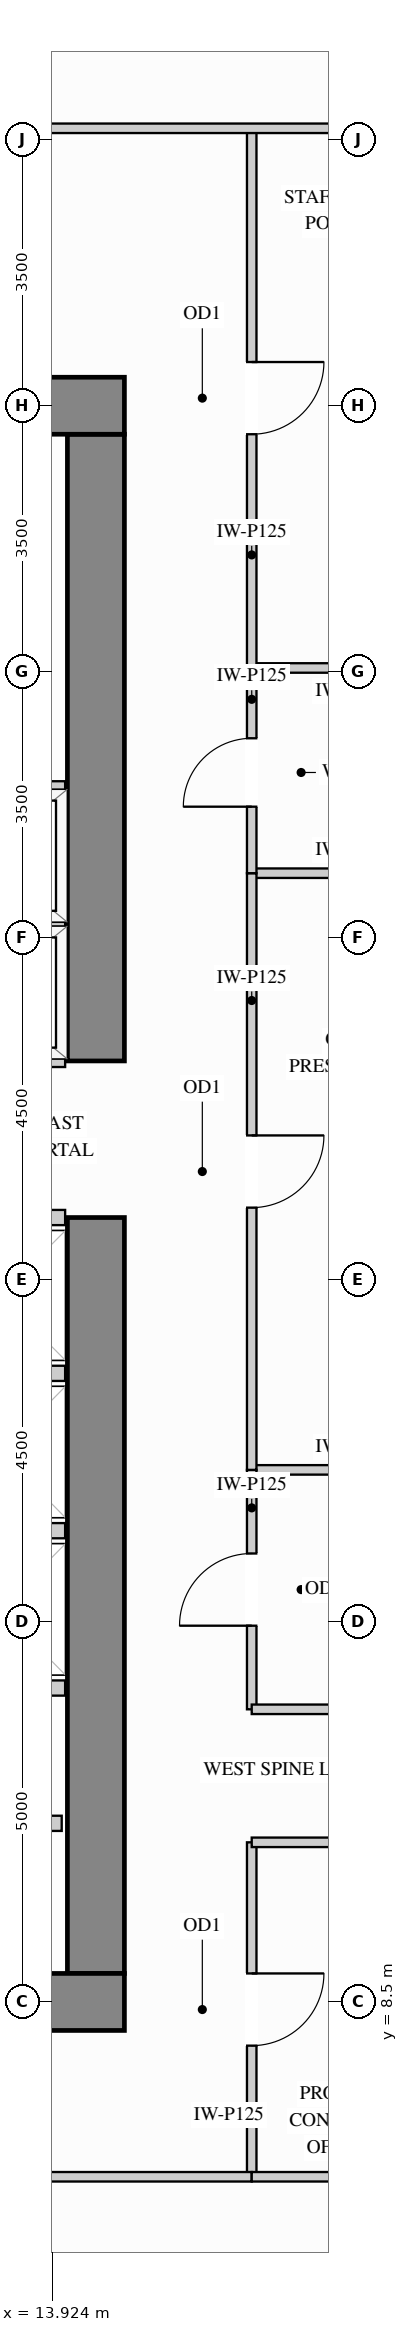
"""IFC4 building model, lengths in metres.
Left out: names, types, materials, properties, quantities, classifications, styles, units other than length and angle.
Written with IfcOpenShell. Run it as: python <this file> out.ifc"""

import sys

from ifc_helpers import new_model, si_unit, direction, frame, frame_2d, origin, place, context, subcontext, project, spatial, rectangle, extrude, source, transform, mapped, element, fill, save


model = new_model("IFC4")
c1 = context("Model", 3, precision=1e-05, world=origin(), true_north=direction((0.0, 1.0)))
c2 = subcontext(c1, "Body", "Model", "MODEL_VIEW")
j1 = project(units=[si_unit("LENGTHUNIT", "METRE"), si_unit("PLANEANGLEUNIT", "RADIAN")], contexts=[c1])
p1 = place(None, origin())
s1 = spatial("IfcSite", under=j1, at=p1, CompositionType="ELEMENT")
p2 = place(p1, origin())
s2 = spatial("IfcBuilding", under=s1, at=p2, CompositionType="ELEMENT")
p3 = place(p2, frame((0.0, 0.0, 135.0)))
s3 = spatial("IfcBuildingStorey", under=s2, at=p3, CompositionType="ELEMENT", Elevation=135.0)
m1 = source(origin(), c2, "Body", "SweptSolid", [
    extrude(rectangle(XDim=9.945, YDim=0.75, at=frame_2d((4.973, 0.0))), origin(), (0.0, 0.0, 1.0), 3.32),
])
p4 = place(p3, frame((14.5, 8.875, 0.0), z_axis=(0.0, 0.0, 1.0), x_axis=(0.0, 1.0, 0.0)))
e1 = element("IfcWall", 1, at=p4, inside=s3, PredefinedType="SHEAR", context=c2, shape_type="MappedRepresentation", body=[
    mapped(m1, transform((0.0, 0.0, 0.0), x_axis=(1.0, 0.0, 0.0), y_axis=(0.0, 1.0, 0.0), z_axis=(0.0, 0.0, 1.0))),
])
m2 = source(origin(), c2, "Body", "SweptSolid", [
    extrude(rectangle(XDim=8.245, YDim=0.75, at=frame_2d((4.123, 0.0))), origin(), (0.0, 0.0, 1.0), 3.32),
])
p5 = place(p3, frame((14.5, 20.88, 0.0), z_axis=(0.0, 0.0, 1.0), x_axis=(0.0, 1.0, 0.0)))
e2 = element("IfcWall", 2, at=p5, inside=s3, PredefinedType="SHEAR", context=c2, shape_type="MappedRepresentation", body=[
    mapped(m2, transform((0.0, 0.0, 0.0), x_axis=(1.0, 0.0, 0.0), y_axis=(0.0, 1.0, 0.0), z_axis=(0.0, 0.0, 1.0))),
])
m3 = source(origin(), c2, "Body", "SweptSolid", [
    extrude(rectangle(XDim=10.75, YDim=0.75, at=frame_2d((5.375, 0.0))), origin(), (0.0, 0.0, 1.0), 3.32),
])
for number, where, z_axis, x_axis in (
    (3, (4.125, 29.5, 0.0), (0.0, 0.0, 1.0), (1.0, 0.0, 0.0)),
    (4, (4.125, 8.5, 0.0), (0.0, 0.0, 1.0), (1.0, 0.0, 0.0)),
):
    element("IfcWall", number, at=place(p3, frame(where, z_axis=z_axis, x_axis=x_axis)), inside=s3, PredefinedType="SHEAR", context=c2, shape_type="MappedRepresentation", body=[
        mapped(m3, transform((0.0, 0.0, 0.0), x_axis=(1.0, 0.0, 0.0), y_axis=(0.0, 1.0, 0.0), z_axis=(0.0, 0.0, 1.0))),
    ])
m4 = source(origin(), c2, "Body", "SweptSolid", [
    extrude(rectangle(XDim=2.6, YDim=0.125, at=frame_2d((1.3, 0.0))), origin(), (0.0, 0.0, 1.0), 3.305),
])
p6 = place(p3, frame((16.55, 15.5, 0.0), z_axis=(0.0, 0.0, 1.0), x_axis=(1.0, 0.0, 0.0)))
e5 = element("IfcWall", 5, at=p6, inside=s3, PredefinedType="PARTITIONING", context=c2, shape_type="MappedRepresentation", body=[
    mapped(m4, transform((0.0, 0.0, 0.0), x_axis=(1.0, 0.0, 0.0), y_axis=(0.0, 1.0, 0.0), z_axis=(0.0, 0.0, 1.0))),
])
m5 = source(origin(), c2, "Body", "SweptSolid", [
    extrude(rectangle(XDim=2.598, YDim=0.125, at=frame_2d((1.299, 0.0))), origin(), (0.0, 0.0, 1.0), 3.305),
])
for number, where, z_axis, x_axis in (
    (6, (16.55, 23.35, 0.0), (0.0, 0.0, 1.0), (1.0, 0.0, 0.0)),
    (7, (16.55, 26.05, 0.0), (0.0, 0.0, 1.0), (1.0, 0.0, 0.0)),
):
    element("IfcWall", number, at=place(p3, frame(where, z_axis=z_axis, x_axis=x_axis)), inside=s3, PredefinedType="PARTITIONING", context=c2, shape_type="MappedRepresentation", body=[
        mapped(m5, transform((0.0, 0.0, 0.0), x_axis=(1.0, 0.0, 0.0), y_axis=(0.0, 1.0, 0.0), z_axis=(0.0, 0.0, 1.0))),
    ])
p7 = place(p3, frame((16.55, 12.35, 0.0), z_axis=(0.0, 0.0, 1.0), x_axis=(0.0, 1.0, 0.0)))
e8 = element("IfcWall", 8, at=p7, inside=s3, PredefinedType="PARTITIONING", context=c2, shape_type="SweptSolid", body=[
    extrude(rectangle(XDim=3.15, YDim=0.125, at=frame_2d((1.575, 0.0))), origin(), (0.0, 0.0, 1.0), 3.305),
])
p8 = place(p7, frame((1.1, 0.0, 0.0)))
e9 = element("IfcOpeningElement", 9, at=p8, cuts=e8, PredefinedType="OPENING", context=c2, shape_type="SweptSolid", body=[
    extrude(rectangle(XDim=0.95, YDim=2.15, at=frame_2d((0.475, 1.075))), frame((0.0, 0.073, 0.0), z_axis=(0.0, -1.0, 0.0), x_axis=(1.0, 0.0, 0.0)), (0.0, 0.0, 1.0), 0.145),
])
p9 = place(p3, frame((16.55, 15.5, 0.0), z_axis=(0.0, 0.0, 1.0), x_axis=(0.0, 1.0, 0.0)))
e10 = element("IfcWall", 10, at=p9, inside=s3, PredefinedType="PARTITIONING", context=c2, shape_type="SweptSolid", body=[
    extrude(rectangle(XDim=7.85, YDim=0.125, at=frame_2d((3.925, 0.0))), origin(), (0.0, 0.0, 1.0), 3.305),
])
p10 = place(p9, frame((3.45, 0.0, 0.0)))
e11 = element("IfcOpeningElement", 11, at=p10, cuts=e10, PredefinedType="OPENING", context=c2, shape_type="SweptSolid", body=[
    extrude(rectangle(XDim=0.95, YDim=2.15, at=frame_2d((0.475, 1.075))), frame((0.0, 0.073, 0.0), z_axis=(0.0, -1.0, 0.0), x_axis=(1.0, 0.0, 0.0)), (0.0, 0.0, 1.0), 0.145),
])
p11 = place(p3, frame((16.55, 26.05, 0.0), z_axis=(0.0, 0.0, 1.0), x_axis=(0.0, 1.0, 0.0)))
e12 = element("IfcWall", 12, at=p11, inside=s3, PredefinedType="PARTITIONING", context=c2, shape_type="SweptSolid", body=[
    extrude(rectangle(XDim=7.1, YDim=0.125, at=frame_2d((3.55, 0.0))), origin(), (0.0, 0.0, 1.0), 3.305),
])
p12 = place(p11, frame((3.075, 0.0, 0.0)))
e13 = element("IfcOpeningElement", 13, at=p12, cuts=e12, PredefinedType="OPENING", context=c2, shape_type="SweptSolid", body=[
    extrude(rectangle(XDim=0.95, YDim=2.15, at=frame_2d((0.475, 1.075))), frame((0.0, 0.073, 0.0), z_axis=(0.0, -1.0, 0.0), x_axis=(1.0, 0.0, 0.0)), (0.0, 0.0, 1.0), 0.145),
])
p13 = place(p3, frame((16.55, 6.2, 0.0), z_axis=(0.0, 0.0, 1.0), x_axis=(0.0, 1.0, 0.0)))
e14 = element("IfcWall", 14, at=p13, inside=s3, PredefinedType="PARTITIONING", context=c2, shape_type="SweptSolid", body=[
    extrude(rectangle(XDim=4.4, YDim=0.125, at=frame_2d((2.2, 0.0))), origin(), (0.0, 0.0, 1.0), 3.305),
])
p14 = place(p13, frame((1.725, 0.0, 0.0)))
e15 = element("IfcOpeningElement", 15, at=p14, cuts=e14, PredefinedType="OPENING", context=c2, shape_type="SweptSolid", body=[
    extrude(rectangle(XDim=0.95, YDim=2.15, at=frame_2d((0.475, 1.075))), frame((0.0, 0.073, 0.0), z_axis=(0.0, -1.0, 0.0), x_axis=(1.0, 0.0, 0.0)), (0.0, 0.0, 1.0), 0.145),
])
p15 = place(p3, frame((16.55, 23.35, 0.0), z_axis=(0.0, 0.0, 1.0), x_axis=(0.0, 1.0, 0.0)))
e16 = element("IfcWall", 16, at=p15, inside=s3, PredefinedType="PARTITIONING", context=c2, shape_type="SweptSolid", body=[
    extrude(rectangle(XDim=2.7, YDim=0.125, at=frame_2d((1.35, 0.0))), origin(), (0.0, 0.0, 1.0), 3.305),
])
p16 = place(p15, frame((0.875, 0.0, 0.0)))
e17 = element("IfcOpeningElement", 17, at=p16, cuts=e16, PredefinedType="OPENING", context=c2, shape_type="SweptSolid", body=[
    extrude(rectangle(XDim=0.9, YDim=2.15, at=frame_2d((0.45, 1.075))), frame((0.0, 0.073, 0.0), z_axis=(0.0, -1.0, 0.0), x_axis=(1.0, 0.0, 0.0)), (0.0, 0.0, 1.0), 0.145),
])
m6 = source(origin(), c2, "Body", "SweptSolid", [
    extrude(rectangle(XDim=12.598, YDim=0.125, at=frame_2d((6.299, 0.0))), origin(), (0.0, 0.0, 1.0), 3.305),
])
p17 = place(p3, frame((6.55, 33.15, 0.0), z_axis=(0.0, 0.0, 1.0), x_axis=(1.0, 0.0, 0.0)))
e18 = element("IfcWall", 18, at=p17, inside=s3, PredefinedType="PARTITIONING", context=c2, shape_type="MappedRepresentation", body=[
    mapped(m6, transform((0.0, 0.0, 0.0), x_axis=(1.0, 0.0, 0.0), y_axis=(0.0, 1.0, 0.0), z_axis=(0.0, 0.0, 1.0))),
])
m7 = source(origin(), c2, "Body", "SweptSolid", [
    extrude(rectangle(XDim=2.95, YDim=0.125, at=frame_2d((1.475, 0.0))), origin(), (0.0, 0.0, 1.0), 3.305),
])
for number, where, z_axis, x_axis in (
    (19, (16.55, 12.35, 0.0), (0.0, 0.0, 1.0), (1.0, 0.0, 0.0)),
    (20, (16.55, 10.6, 0.0), (0.0, 0.0, 1.0), (1.0, 0.0, 0.0)),
):
    element("IfcWall", number, at=place(p3, frame(where, z_axis=z_axis, x_axis=x_axis)), inside=s3, PredefinedType="PARTITIONING", context=c2, shape_type="MappedRepresentation", body=[
        mapped(m7, transform((0.0, 0.0, 0.0), x_axis=(1.0, 0.0, 0.0), y_axis=(0.0, 1.0, 0.0), z_axis=(0.0, 0.0, 1.0))),
    ])
p18 = place(p3, frame((2.45, 6.2, 0.0), z_axis=(0.0, 0.0, 1.0), x_axis=(1.0, 0.0, 0.0)))
e21 = element("IfcWall", 21, at=p18, inside=s3, PredefinedType="PARTITIONING", context=c2, shape_type="SweptSolid", body=[
    extrude(rectangle(XDim=14.1, YDim=0.125, at=frame_2d((7.05, 0.0))), origin(), (0.0, 0.0, 1.0), 2.768),
])
p19 = place(p18, frame((6.575, 0.0, 0.0)))
e22 = element("IfcOpeningElement", 22, at=p19, cuts=e21, PredefinedType="OPENING", context=c2, shape_type="SweptSolid", body=[
    extrude(rectangle(XDim=0.95, YDim=2.15, at=frame_2d((0.475, 1.075))), frame((0.0, 0.073, 0.0), z_axis=(0.0, -1.0, 0.0), x_axis=(1.0, 0.0, 0.0)), (0.0, 0.0, 1.0), 0.145),
])
m8 = source(origin(), c2, "Body", "SweptSolid", [
    extrude(rectangle(XDim=2.598, YDim=0.125, at=frame_2d((1.299, 0.0))), origin(), (0.0, 0.0, 1.0), 2.768),
])
p20 = place(p3, frame((16.55, 6.2, 0.0), z_axis=(0.0, 0.0, 1.0), x_axis=(1.0, 0.0, 0.0)))
e23 = element("IfcWall", 23, at=p20, inside=s3, PredefinedType="PARTITIONING", context=c2, shape_type="MappedRepresentation", body=[
    mapped(m8, transform((0.0, 0.0, 0.0), x_axis=(1.0, 0.0, 0.0), y_axis=(0.0, 1.0, 0.0), z_axis=(0.0, 0.0, 1.0))),
])
m9 = source(origin(), c2, "Body", "SweptSolid", [
    extrude(rectangle(XDim=1.63, YDim=0.2, at=frame_2d((0.815, 0.0))), origin(), (0.0, 0.0, 1.0), 3.305),
])
p21 = place(p3, frame((12.42, 10.85, 0.0), z_axis=(0.0, 0.0, 1.0), x_axis=(1.0, 0.0, 0.0)))
e24 = element("IfcWall", 24, at=p21, inside=s3, PredefinedType="PARTITIONING", context=c2, shape_type="MappedRepresentation", body=[
    mapped(m9, transform((0.0, 0.0, 0.0), x_axis=(1.0, 0.0, 0.0), y_axis=(0.0, 1.0, 0.0), z_axis=(0.0, 0.0, 1.0))),
])
m10 = source(origin(), c2, "Body", "SweptSolid", [
    extrude(rectangle(XDim=2.265, YDim=0.2, at=frame_2d((1.132, 0.0))), origin(), (0.0, 0.0, 1.0), 3.305),
])
for number, where, z_axis, x_axis in (
    (25, (11.83, 22.66, 0.0), (0.0, 0.0, 1.0), (1.0, 0.0, 0.0)),
    (26, (11.83, 20.9, 0.0), (0.0, 0.0, 1.0), (1.0, 0.0, 0.0)),
    (27, (11.83, 24.46, 0.0), (0.0, 0.0, 1.0), (1.0, 0.0, 0.0)),
):
    element("IfcWall", number, at=place(p3, frame(where, z_axis=z_axis, x_axis=x_axis)), inside=s3, PredefinedType="PARTITIONING", context=c2, shape_type="MappedRepresentation", body=[
        mapped(m10, transform((0.0, 0.0, 0.0), x_axis=(1.0, 0.0, 0.0), y_axis=(0.0, 1.0, 0.0), z_axis=(0.0, 0.0, 1.0))),
    ])
m11 = source(origin(), c2, "Body", "SweptSolid", [
    extrude(rectangle(XDim=1.865, YDim=0.2, at=frame_2d((0.933, 0.0))), origin(), (0.0, 0.0, 1.0), 3.305),
])
for number, where, z_axis, x_axis in (
    (28, (12.23, 14.7, 0.0), (0.0, 0.0, 1.0), (1.0, 0.0, 0.0)),
    (29, (12.23, 12.63, 0.0), (0.0, 0.0, 1.0), (1.0, 0.0, 0.0)),
    (30, (12.23, 16.77, 0.0), (0.0, 0.0, 1.0), (1.0, 0.0, 0.0)),
    (31, (12.23, 18.82, 0.0), (0.0, 0.0, 1.0), (1.0, 0.0, 0.0)),
):
    element("IfcWall", number, at=place(p3, frame(where, z_axis=z_axis, x_axis=x_axis)), inside=s3, PredefinedType="PARTITIONING", context=c2, shape_type="MappedRepresentation", body=[
        mapped(m11, transform((0.0, 0.0, 0.0), x_axis=(1.0, 0.0, 0.0), y_axis=(0.0, 1.0, 0.0), z_axis=(0.0, 0.0, 1.0))),
    ])
m12 = source(origin(), c2, "Body", "SweptSolid", [
    extrude(rectangle(XDim=0.95, YDim=2.15, at=frame_2d((0.475, 1.075))), frame((0.0, 0.025, 0.0), z_axis=(0.0, -1.0, 0.0), x_axis=(1.0, 0.0, 0.0)), (0.0, 0.0, 1.0), 0.05),
])
p22 = place(p14, origin())
e32 = element("IfcDoor", 32, at=p22, inside=s3, OperationType="SINGLE_SWING_RIGHT", PredefinedType="DOOR", context=c2, shape_type="MappedRepresentation", body=[
    mapped(m12, transform((0.0, 0.0, 0.0), x_axis=(1.0, 0.0, 0.0), y_axis=(0.0, 1.0, 0.0), z_axis=(0.0, 0.0, 1.0))),
])
fill(e15, e32)
p23 = place(p8, origin())
e33 = element("IfcDoor", 33, at=p23, inside=s3, OperationType="SINGLE_SWING_LEFT", PredefinedType="DOOR", context=c2, shape_type="MappedRepresentation", body=[
    mapped(m12, transform((0.0, 0.0, 0.0), x_axis=(1.0, 0.0, 0.0), y_axis=(0.0, 1.0, 0.0), z_axis=(0.0, 0.0, 1.0))),
])
fill(e9, e33)
p24 = place(p10, origin())
e34 = element("IfcDoor", 34, at=p24, inside=s3, OperationType="SINGLE_SWING_RIGHT", PredefinedType="DOOR", context=c2, shape_type="MappedRepresentation", body=[
    mapped(m12, transform((0.0, 0.0, 0.0), x_axis=(1.0, 0.0, 0.0), y_axis=(0.0, 1.0, 0.0), z_axis=(0.0, 0.0, 1.0))),
])
fill(e11, e34)
p25 = place(p12, origin())
e35 = element("IfcDoor", 35, at=p25, inside=s3, OperationType="SINGLE_SWING_RIGHT", PredefinedType="DOOR", context=c2, shape_type="MappedRepresentation", body=[
    mapped(m12, transform((0.0, 0.0, 0.0), x_axis=(1.0, 0.0, 0.0), y_axis=(0.0, 1.0, 0.0), z_axis=(0.0, 0.0, 1.0))),
])
fill(e13, e35)
m13 = source(origin(), c2, "Body", "SweptSolid", [
    extrude(rectangle(XDim=0.9, YDim=2.15, at=frame_2d((0.45, 1.075))), frame((0.0, 0.025, 0.0), z_axis=(0.0, -1.0, 0.0), x_axis=(1.0, 0.0, 0.0)), (0.0, 0.0, 1.0), 0.05),
])
p26 = place(p16, origin())
e36 = element("IfcDoor", 36, at=p26, inside=s3, OperationType="SINGLE_SWING_LEFT", PredefinedType="DOOR", context=c2, shape_type="MappedRepresentation", body=[
    mapped(m13, transform((0.0, 0.0, 0.0), x_axis=(1.0, 0.0, 0.0), y_axis=(0.0, 1.0, 0.0), z_axis=(0.0, 0.0, 1.0))),
])
fill(e17, e36)
save(model, sys.argv[1])
